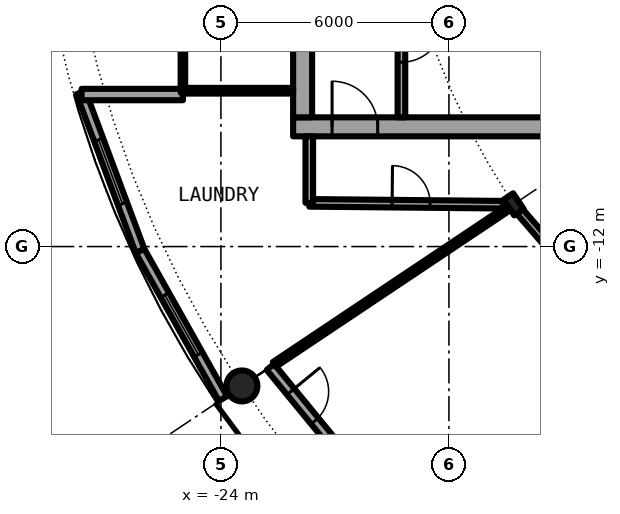
"""IFC4 building model, lengths in metres.
Left out: names, types, materials, properties, quantities, classifications, styles, units other than length and angle.
Written with IfcOpenShell. Run it as: python <this file> out.ifc"""

import sys

from ifc_helpers import new_model, si_unit, direction, frame, frame_2d, origin, origin_2d, place, context, subcontext, project, spatial, rectangle, hollow_circle, i_section, extrude, element, fill, save


model = new_model("IFC4")
c1 = context("Model", 3, precision=1e-05, world=origin(), true_north=direction((0.0, 1.0)))
c2 = subcontext(c1, "Body", "Model", "MODEL_VIEW")
j1 = project(units=[si_unit("LENGTHUNIT", "METRE"), si_unit("PLANEANGLEUNIT", "RADIAN")], contexts=[c1])
p1 = place(None, origin())
s1 = spatial("IfcSite", under=j1, at=p1, CompositionType="ELEMENT")
p2 = place(p1, origin())
s2 = spatial("IfcBuilding", under=s1, at=p2, CompositionType="ELEMENT")
p3 = place(p2, frame((0.0, 0.0, 157.4)))
s3 = spatial("IfcBuildingStorey", under=s2, at=p3, CompositionType="ELEMENT", Elevation=157.4)
p4 = place(p3, frame((-23.448, -15.667, 0.0), z_axis=(0.0, 0.0, 1.0), x_axis=(1.0, 0.0, 0.0)))
e1 = element("IfcColumn", 1, at=p4, inside=s3, PredefinedType="COLUMN", context=c2, shape_type="SweptSolid", body=[
    extrude(hollow_circle(Radius=0.406, WallThickness=0.04, at=origin_2d()), origin(), (0.0, 0.0, 1.0), 4.2),
])
p5 = place(p3, frame((-16.297, -10.889, 0.0), z_axis=(0.0, 0.0, 1.0), x_axis=(-0.831469612303, -0.55557023302, 0.0)))
e2 = element("IfcColumn", 2, at=p5, inside=s3, PredefinedType="COLUMN", context=c2, shape_type="SweptSolid", body=[
    extrude(i_section(OverallWidth=0.3, OverallDepth=0.5, WebThickness=0.014, FlangeThickness=0.028, FilletRadius=0.027, at=origin_2d()), origin(), (0.0, 0.0, 1.0), 4.2),
])
p6 = place(p3, frame((-22.699, -15.167, 0.0), z_axis=(0.0, 0.0, 1.0), x_axis=(0.634382322723, -0.773019449054, 0.0)))
e3 = element("IfcWall", 3, at=p6, inside=s3, PredefinedType="SOLIDWALL", context=c2, shape_type="SweptSolid", body=[
    extrude(rectangle(XDim=5.352, YDim=0.25, at=frame_2d((2.676, 0.0))), origin(), (0.0, 0.0, 1.0), 3.85),
])
p7 = place(p6, frame((0.841, 0.0, 0.0)))
e4 = element("IfcOpeningElement", 4, at=p7, cuts=e3, PredefinedType="OPENING", context=c2, shape_type="SweptSolid", body=[
    extrude(rectangle(XDim=1.0, YDim=2.2, at=frame_2d((0.5, 1.1))), frame((0.0, 0.135, 0.0), z_axis=(0.0, -1.0, 0.0), x_axis=(1.0, 0.0, 0.0)), (0.0, 0.0, 1.0), 0.27),
])
p8 = place(p6, frame((3.51, 0.0, 0.0)))
e5 = element("IfcOpeningElement", 5, at=p8, cuts=e3, PredefinedType="OPENING", context=c2, shape_type="SweptSolid", body=[
    extrude(rectangle(XDim=1.0, YDim=2.2, at=frame_2d((0.5, 1.1))), frame((0.0, 0.135, 0.0), z_axis=(0.0, -1.0, 0.0), x_axis=(1.0, 0.0, 0.0)), (0.0, 0.0, 1.0), 0.27),
])
p9 = place(p3, frame((-27.682, -7.945, 0.0), z_axis=(0.0, 0.0, 1.0), x_axis=(0.349247811493, -0.937030397675, 0.0)))
e6 = element("IfcWall", 6, at=p9, inside=s3, PredefinedType="SOLIDWALL", context=c2, shape_type="SweptSolid", body=[
    extrude(rectangle(XDim=4.452, YDim=0.25, at=frame_2d((2.226, 0.0))), origin(), (0.0, 0.0, 1.0), 3.85),
])
p10 = place(p9, frame((1.327, 0.0, 0.3)))
e7 = element("IfcOpeningElement", 7, at=p10, cuts=e6, PredefinedType="OPENING", context=c2, shape_type="SweptSolid", body=[
    extrude(rectangle(XDim=1.8, YDim=2.1, at=frame_2d((0.9, 1.05))), frame((0.0, 0.135, 0.0), z_axis=(0.0, -1.0, 0.0), x_axis=(1.0, 0.0, 0.0)), (0.0, 0.0, 1.0), 0.27),
])
p11 = place(p3, frame((-26.127, -12.117, 0.0), z_axis=(0.0, 0.0, 1.0), x_axis=(0.489696356642, -0.871893042919, 0.0)))
e8 = element("IfcWall", 8, at=p11, inside=s3, PredefinedType="SOLIDWALL", context=c2, shape_type="SweptSolid", body=[
    extrude(rectangle(XDim=4.454, YDim=0.25, at=frame_2d((2.227, 0.0))), origin(), (0.0, 0.0, 1.0), 3.85),
])
p12 = place(p11, frame((1.327, 0.0, 0.3)))
e9 = element("IfcOpeningElement", 9, at=p12, cuts=e8, PredefinedType="OPENING", context=c2, shape_type="SweptSolid", body=[
    extrude(rectangle(XDim=1.8, YDim=2.1, at=frame_2d((0.9, 1.05))), frame((0.0, 0.135, 0.0), z_axis=(0.0, -1.0, 0.0), x_axis=(1.0, 0.0, 0.0)), (0.0, 0.0, 1.0), 0.27),
])
p13 = place(p3, frame((-25.0, -8.0, 0.0), z_axis=(0.0, 0.0, 1.0), x_axis=(-1.0, 0.0, 0.0)))
e10 = element("IfcWall", 10, at=p13, inside=s3, PredefinedType="SOLIDWALL", context=c2, shape_type="SweptSolid", body=[
    extrude(rectangle(XDim=2.667, YDim=0.3, at=frame_2d((1.333, 0.0))), origin(), (0.0, 0.0, 1.0), 3.85),
])
p14 = place(p3, frame((-22.1, -8.85, 0.0), z_axis=(0.0, 0.0, 1.0), x_axis=(1.0, 0.0, 0.0)))
e11 = element("IfcWall", 11, at=p14, inside=s3, PredefinedType="SHEAR", context=c2, shape_type="SweptSolid", body=[
    extrude(rectangle(XDim=13.6, YDim=0.5, at=frame_2d((6.8, 0.0))), origin(), (0.0, 0.0, 1.0), 4.2),
])
p15 = place(p14, frame((1.025, 0.0, 0.0)))
e12 = element("IfcOpeningElement", 12, at=p15, cuts=e11, PredefinedType="OPENING", context=c2, shape_type="SweptSolid", body=[
    extrude(rectangle(XDim=1.2, YDim=2.3, at=frame_2d((0.6, 1.15))), frame((0.0, 0.26, 0.0), z_axis=(0.0, -1.0, 0.0), x_axis=(1.0, 0.0, 0.0)), (0.0, 0.0, 1.0), 0.52),
])
p16 = place(p3, frame((-21.85, -8.6, 0.0), z_axis=(0.0, 0.0, 1.0), x_axis=(0.0, 1.0, 0.0)))
e13 = element("IfcWall", 13, at=p16, inside=s3, PredefinedType="SHEAR", context=c2, shape_type="SweptSolid", body=[
    extrude(rectangle(XDim=17.2, YDim=0.5, at=frame_2d((8.6, 0.0))), origin(), (0.0, 0.0, 1.0), 4.2),
])
p17 = place(p16, frame((7.7, 0.0, 0.0)))
e14 = element("IfcOpeningElement", 14, at=p17, cuts=e13, PredefinedType="OPENING", context=c2, shape_type="SweptSolid", body=[
    extrude(rectangle(XDim=1.8, YDim=2.3, at=frame_2d((0.9, 1.15))), frame((0.0, 0.26, 0.0), z_axis=(0.0, -1.0, 0.0), x_axis=(1.0, 0.0, 0.0)), (0.0, 0.0, 1.0), 0.52),
])
p18 = place(p3, frame((-19.25, -1.575, 0.0), z_axis=(0.0, 0.0, 1.0), x_axis=(0.0, -1.0, 0.0)))
e15 = element("IfcWall", 15, at=p18, inside=s3, PredefinedType="SOLIDWALL", context=c2, shape_type="SweptSolid", body=[
    extrude(rectangle(XDim=7.025, YDim=0.2, at=frame_2d((3.513, 0.0))), origin(), (0.0, 0.0, 1.0), 3.85),
])
p19 = place(p18, frame((4.475, 0.0, 0.0)))
e16 = element("IfcOpeningElement", 16, at=p19, cuts=e15, PredefinedType="OPENING", context=c2, shape_type="SweptSolid", body=[
    extrude(rectangle(XDim=1.1, YDim=2.3, at=frame_2d((0.55, 1.15))), frame((0.0, 0.11, 0.0), z_axis=(0.0, -1.0, 0.0), x_axis=(1.0, 0.0, 0.0)), (0.0, 0.0, 1.0), 0.22),
])
p20 = place(p3, frame((-22.1, -7.9, 0.0), z_axis=(0.0, 0.0, 1.0), x_axis=(-1.0, 0.0, 0.0)))
e17 = element("IfcWall", 17, at=p20, inside=s3, PredefinedType="PARTITIONING", context=c2, shape_type="SweptSolid", body=[
    extrude(rectangle(XDim=2.84, YDim=0.15, at=frame_2d((1.42, 0.0))), origin(), (0.0, 0.0, 1.0), 3.85),
])
p21 = place(p3, frame((-25.0, 7.95, 0.0), z_axis=(0.0, 0.0, 1.0), x_axis=(0.0, -1.0, 0.0)))
e18 = element("IfcWall", 18, at=p21, inside=s3, PredefinedType="PARTITIONING", context=c2, shape_type="SweptSolid", body=[
    extrude(rectangle(XDim=15.9, YDim=0.12, at=frame_2d((7.95, 0.0))), origin(), (0.0, 0.0, 1.0), 3.85),
])
p22 = place(p21, frame((0.95, 0.0, 0.1)))
e19 = element("IfcOpeningElement", 19, at=p22, cuts=e18, PredefinedType="OPENING", context=c2, shape_type="SweptSolid", body=[
    extrude(rectangle(XDim=14.0, YDim=3.5, at=frame_2d((7.0, 1.75))), frame((0.0, 0.07, 0.0), z_axis=(0.0, -1.0, 0.0), x_axis=(1.0, 0.0, 0.0)), (0.0, 0.0, 1.0), 0.14),
])
p23 = place(p3, frame((-16.198, -11.004, 0.0), z_axis=(0.0, 0.0, 1.0), x_axis=(0.653094461639, -0.757276451619, 0.0)))
e20 = element("IfcWall", 20, at=p23, inside=s3, PredefinedType="PARTITIONING", context=c2, shape_type="SweptSolid", body=[
    extrude(rectangle(XDim=4.647, YDim=0.2, at=frame_2d((2.323, 0.0))), origin(), (0.0, 0.0, 1.0), 3.54),
])
p24 = place(p3, frame((-21.675, -10.85, 0.0), z_axis=(0.0, 0.0, 1.0), x_axis=(0.999954045313, -0.009586827528, 0.0)))
e21 = element("IfcWall", 21, at=p24, inside=s3, PredefinedType="PARTITIONING", context=c2, shape_type="SweptSolid", body=[
    extrude(rectangle(XDim=5.093, YDim=0.2, at=frame_2d((2.547, 0.0))), origin(), (0.0, 0.0, 1.0), 3.85),
])
p25 = place(p24, frame((2.18, 0.0, 0.0)))
e22 = element("IfcOpeningElement", 22, at=p25, cuts=e21, PredefinedType="OPENING", context=c2, shape_type="SweptSolid", body=[
    extrude(rectangle(XDim=1.0, YDim=2.3, at=frame_2d((0.5, 1.15))), frame((0.0, 0.11, 0.0), z_axis=(0.0, -1.0, 0.0), x_axis=(1.0, 0.0, 0.0)), (0.0, 0.0, 1.0), 0.22),
])
p26 = place(p3, frame((-22.593, -15.101, 0.0), z_axis=(0.0, 0.0, 1.0), x_axis=(0.831419048668, 0.555645899393, 0.0)))
e23 = element("IfcWall", 23, at=p26, inside=s3, PredefinedType="PARTITIONING", context=c2, shape_type="SweptSolid", body=[
    extrude(rectangle(XDim=7.325, YDim=0.15, at=frame_2d((3.663, 0.0))), origin(), (0.0, 0.0, 1.0), 3.85),
])
p27 = place(p3, frame((-21.675, -10.85, 0.0), z_axis=(0.0, 0.0, 1.0), x_axis=(0.0, 1.0, 0.0)))
e24 = element("IfcWall", 24, at=p27, inside=s3, PredefinedType="PARTITIONING", context=c2, shape_type="SweptSolid", body=[
    extrude(rectangle(XDim=1.75, YDim=0.2, at=frame_2d((0.875, 0.0))), origin(), (0.0, 0.0, 1.0), 3.85),
])
p28 = place(p7, origin())
e25 = element("IfcDoor", 25, at=p28, inside=s3, OperationType="SINGLE_SWING_LEFT", PredefinedType="DOOR", context=c2, shape_type="SweptSolid", body=[
    extrude(rectangle(XDim=1.0, YDim=2.2, at=frame_2d((0.5, 1.1))), frame((0.0, 0.025, 0.0), z_axis=(0.0, -1.0, 0.0), x_axis=(1.0, 0.0, 0.0)), (0.0, 0.0, 1.0), 0.05),
])
fill(e4, e25)
p29 = place(p10, origin())
e26 = element("IfcWindow", 26, at=p29, inside=s3, PartitioningType="SINGLE_PANEL", PredefinedType="WINDOW", context=c2, shape_type="SweptSolid", body=[
    extrude(rectangle(XDim=1.8, YDim=2.1, at=frame_2d((0.9, 1.05))), frame((0.0, 0.03, 0.0), z_axis=(0.0, -1.0, 0.0), x_axis=(1.0, 0.0, 0.0)), (0.0, 0.0, 1.0), 0.06),
])
fill(e7, e26)
p30 = place(p12, origin())
e27 = element("IfcWindow", 27, at=p30, inside=s3, PartitioningType="SINGLE_PANEL", PredefinedType="WINDOW", context=c2, shape_type="SweptSolid", body=[
    extrude(rectangle(XDim=1.8, YDim=2.1, at=frame_2d((0.9, 1.05))), frame((0.0, 0.03, 0.0), z_axis=(0.0, -1.0, 0.0), x_axis=(1.0, 0.0, 0.0)), (0.0, 0.0, 1.0), 0.06),
])
fill(e9, e27)
p31 = place(p19, origin())
e28 = element("IfcDoor", 28, at=p31, inside=s3, OperationType="SINGLE_SWING_LEFT", PredefinedType="DOOR", context=c2, shape_type="SweptSolid", body=[
    extrude(rectangle(XDim=1.1, YDim=2.3, at=frame_2d((0.55, 1.15))), frame((0.0, 0.025, 0.0), z_axis=(0.0, -1.0, 0.0), x_axis=(1.0, 0.0, 0.0)), (0.0, 0.0, 1.0), 0.05),
])
fill(e16, e28)
p32 = place(p15, origin())
e29 = element("IfcDoor", 29, at=p32, inside=s3, OperationType="SINGLE_SWING_RIGHT", PredefinedType="DOOR", context=c2, shape_type="SweptSolid", body=[
    extrude(rectangle(XDim=1.2, YDim=2.3, at=frame_2d((0.6, 1.15))), frame((0.0, 0.025, 0.0), z_axis=(0.0, -1.0, 0.0), x_axis=(1.0, 0.0, 0.0)), (0.0, 0.0, 1.0), 0.05),
])
fill(e12, e29)
p33 = place(p22, origin())
e30 = element("IfcWindow", 30, at=p33, inside=s3, PartitioningType="SINGLE_PANEL", PredefinedType="WINDOW", context=c2, shape_type="SweptSolid", body=[
    extrude(rectangle(XDim=14.0, YDim=3.5, at=frame_2d((7.0, 1.75))), frame((0.0, 0.03, 0.0), z_axis=(0.0, -1.0, 0.0), x_axis=(1.0, 0.0, 0.0)), (0.0, 0.0, 1.0), 0.06),
])
fill(e19, e30)
p34 = place(p25, origin())
e31 = element("IfcDoor", 31, at=p34, inside=s3, OperationType="SINGLE_SWING_RIGHT", PredefinedType="DOOR", context=c2, shape_type="SweptSolid", body=[
    extrude(rectangle(XDim=1.0, YDim=2.3, at=frame_2d((0.5, 1.15))), frame((0.0, 0.025, 0.0), z_axis=(0.0, -1.0, 0.0), x_axis=(1.0, 0.0, 0.0)), (0.0, 0.0, 1.0), 0.05),
])
fill(e22, e31)
save(model, sys.argv[1])
